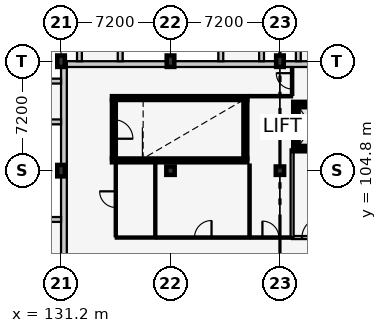
"""IFC4 building model, lengths in metres.
Left out: names, types, materials, properties, quantities, classifications, styles, units other than length and angle.
Written with IfcOpenShell. Run it as: python <this file> out.ifc"""

import sys

from ifc_helpers import new_model, si_unit, direction, frame, frame_2d, origin, origin_2d, place, context, subcontext, project, spatial, rectangle, extrude, element, fill, save


model = new_model("IFC4")
c1 = context("Model", 3, precision=1e-05, world=origin(), true_north=direction((0.0, 1.0)))
c2 = subcontext(c1, "Body", "Model", "MODEL_VIEW")
j1 = project(units=[si_unit("LENGTHUNIT", "METRE"), si_unit("PLANEANGLEUNIT", "RADIAN")], contexts=[c1])
p1 = place(None, origin())
s1 = spatial("IfcSite", under=j1, at=p1, CompositionType="ELEMENT")
p2 = place(p1, origin())
s2 = spatial("IfcBuilding", under=s1, at=p2, CompositionType="ELEMENT")
p3 = place(p2, frame((0.0, 0.0, 29.7)))
s3 = spatial("IfcBuildingStorey", under=s2, at=p3, CompositionType="ELEMENT", Elevation=29.7)
for number, where, z_axis, x_axis in (
    (1, (131.2, 104.8, 0.0), (0.0, 0.0, 1.0), (1.0, 0.0, 0.0)),
    (2, (131.2, 112.0, 0.0), (0.0, 0.0, 1.0), (1.0, 0.0, 0.0)),
):
    element("IfcColumn", number, at=place(p3, frame(where, z_axis=z_axis, x_axis=x_axis)), inside=s3, PredefinedType="COLUMN", context=c2, shape_type="SweptSolid", body=[
        extrude(rectangle(XDim=0.5, YDim=0.75, at=origin_2d()), origin(), (0.0, 0.0, 1.0), 4.2),
    ])
p4 = place(p3, frame((138.4, 104.8, 0.0), z_axis=(0.0, 0.0, 1.0), x_axis=(1.0, 0.0, 0.0)))
e3 = element("IfcColumn", 3, at=p4, inside=s3, PredefinedType="COLUMN", context=c2, shape_type="SweptSolid", body=[
    extrude(rectangle(XDim=0.55, YDim=0.55, at=origin_2d()), origin(), (0.0, 0.0, 1.0), 4.2),
])
p5 = place(p3, frame((138.4, 112.0, 0.0), z_axis=(0.0, 0.0, 1.0), x_axis=(1.0, 0.0, 0.0)))
e4 = element("IfcColumn", 4, at=p5, inside=s3, PredefinedType="COLUMN", context=c2, shape_type="SweptSolid", body=[
    extrude(rectangle(XDim=0.5, YDim=0.75, at=origin_2d()), origin(), (0.0, 0.0, 1.0), 4.2),
])
p6 = place(p3, frame((145.6, 104.8, 0.0), z_axis=(0.0, 0.0, 1.0), x_axis=(1.0, 0.0, 0.0)))
e5 = element("IfcColumn", 5, at=p6, inside=s3, PredefinedType="COLUMN", context=c2, shape_type="SweptSolid", body=[
    extrude(rectangle(XDim=0.55, YDim=0.55, at=origin_2d()), origin(), (0.0, 0.0, 1.0), 4.2),
])
p7 = place(p3, frame((145.6, 112.0, 0.0), z_axis=(0.0, 0.0, 1.0), x_axis=(1.0, 0.0, 0.0)))
e6 = element("IfcColumn", 6, at=p7, inside=s3, PredefinedType="COLUMN", context=c2, shape_type="SweptSolid", body=[
    extrude(rectangle(XDim=0.5, YDim=0.75, at=origin_2d()), origin(), (0.0, 0.0, 1.0), 4.2),
])
p8 = place(p3, frame((131.2, 111.81, 0.0), z_axis=(0.0, 0.0, 1.0), x_axis=(1.0, 0.0, 0.0)))
e7 = element("IfcWall", 7, at=p8, inside=s3, PredefinedType="SOLIDWALL", context=c2, shape_type="SweptSolid", body=[
    extrude(rectangle(XDim=28.8, YDim=0.38, at=frame_2d((14.4, 0.0))), origin(), (0.0, 0.0, 1.0), 3.495),
])
p9 = place(p3, frame((132.41, 112.0, 0.0), z_axis=(0.0, 0.0, 1.0), x_axis=(0.0, 1.0, 0.0)))
e8 = element("IfcWall", 8, at=p9, inside=s3, PredefinedType="SOLIDWALL", context=c2, shape_type="SweptSolid", body=[
    extrude(rectangle(XDim=1.793, YDim=0.32, at=frame_2d((0.896, 0.0))), origin(), (0.0, 0.0, 1.0), 4.18),
])
for number, where, z_axis, x_axis in (
    (9, (135.09, 112.0, 0.0), (0.0, 0.0, 1.0), (0.0, 1.0, 0.0)),
    (10, (141.71, 112.0, 0.0), (0.0, 0.0, 1.0), (0.0, 1.0, 0.0)),
):
    element("IfcWall", number, at=place(p3, frame(where, z_axis=z_axis, x_axis=x_axis)), inside=s3, PredefinedType="SOLIDWALL", context=c2, shape_type="SweptSolid", body=[
        extrude(rectangle(XDim=1.35, YDim=0.32, at=frame_2d((0.675, 0.0))), origin(), (0.0, 0.0, 1.0), 4.18),
    ])
for number, where, z_axis, x_axis in (
    (11, (144.39, 112.0, 0.0), (0.0, 0.0, 1.0), (0.0, 1.0, 0.0)),
    (12, (146.81, 112.0, 0.0), (0.0, 0.0, 1.0), (0.0, 1.0, 0.0)),
):
    element("IfcWall", number, at=place(p3, frame(where, z_axis=z_axis, x_axis=x_axis)), inside=s3, PredefinedType="SOLIDWALL", context=c2, shape_type="SweptSolid", body=[
        extrude(rectangle(XDim=1.793, YDim=0.32, at=frame_2d((0.896, 0.0))), origin(), (0.0, 0.0, 1.0), 4.18),
    ])
p10 = place(p3, frame((131.39, 83.2, 0.0), z_axis=(0.0, 0.0, 1.0), x_axis=(0.0, 1.0, 0.0)))
e13 = element("IfcWall", 13, at=p10, inside=s3, PredefinedType="SOLIDWALL", context=c2, shape_type="SweptSolid", body=[
    extrude(rectangle(XDim=28.8, YDim=0.38, at=frame_2d((14.4, 0.0))), origin(), (0.0, 0.0, 1.0), 3.455),
])
p11 = place(p10, frame((10.2, 0.0, 0.0)))
e14 = element("IfcOpeningElement", 14, at=p11, cuts=e13, PredefinedType="OPENING", context=c2, shape_type="SweptSolid", body=[
    extrude(rectangle(XDim=1.2, YDim=2.15, at=frame_2d((0.6, 1.075))), frame((0.0, 0.202, 0.0), z_axis=(0.0, -1.0, 0.0), x_axis=(1.0, 0.0, 0.0)), (0.0, 0.0, 1.0), 0.404),
])
for number, where, z_axis, x_axis in (
    (15, (131.2, 101.59, 0.0), (0.0, 0.0, 1.0), (-1.0, 0.0, 0.0)),
    (16, (131.2, 108.01, 0.0), (0.0, 0.0, 1.0), (-1.0, 0.0, 0.0)),
):
    element("IfcWall", number, at=place(p3, frame(where, z_axis=z_axis, x_axis=x_axis)), inside=s3, PredefinedType="SOLIDWALL", context=c2, shape_type="SweptSolid", body=[
        extrude(rectangle(XDim=1.35, YDim=0.32, at=frame_2d((0.675, 0.0))), origin(), (0.0, 0.0, 1.0), 4.18),
    ])
p12 = place(p3, frame((131.2, 110.69, 0.0), z_axis=(0.0, 0.0, 1.0), x_axis=(-1.0, 0.0, 0.0)))
e17 = element("IfcWall", 17, at=p12, inside=s3, PredefinedType="SOLIDWALL", context=c2, shape_type="SweptSolid", body=[
    extrude(rectangle(XDim=1.793, YDim=0.32, at=frame_2d((0.896, 0.0))), origin(), (0.0, 0.0, 1.0), 4.18),
])
for number, where, z_axis, x_axis in (
    (18, (134.55, 105.475, 0.0), (0.0, 0.0, 1.0), (1.0, 0.0, 0.0)),
    (19, (143.45, 109.575, 0.0), (0.0, 0.0, 1.0), (-1.0, 0.0, 0.0)),
):
    element("IfcWall", number, at=place(p3, frame(where, z_axis=z_axis, x_axis=x_axis)), inside=s3, PredefinedType="SHEAR", context=c2, shape_type="SweptSolid", body=[
        extrude(rectangle(XDim=8.9, YDim=0.25, at=frame_2d((4.45, 0.0))), origin(), (0.0, 0.0, 1.0), 4.2),
    ])
p13 = place(p3, frame((134.675, 109.45, 0.0), z_axis=(0.0, 0.0, 1.0), x_axis=(0.0, -1.0, 0.0)))
e20 = element("IfcWall", 20, at=p13, inside=s3, PredefinedType="SHEAR", context=c2, shape_type="SweptSolid", body=[
    extrude(rectangle(XDim=3.85, YDim=0.25, at=frame_2d((1.925, 0.0))), origin(), (0.0, 0.0, 1.0), 4.2),
])
p14 = place(p13, frame((1.3, 0.0, 0.0)))
e21 = element("IfcOpeningElement", 21, at=p14, cuts=e20, PredefinedType="OPENING", context=c2, shape_type="SweptSolid", body=[
    extrude(rectangle(XDim=1.25, YDim=2.15, at=frame_2d((0.625, 1.075))), frame((0.0, 0.137, 0.0), z_axis=(0.0, -1.0, 0.0), x_axis=(1.0, 0.0, 0.0)), (0.0, 0.0, 1.0), 0.274),
])
p15 = place(p3, frame((143.325, 105.6, 0.0), z_axis=(0.0, 0.0, 1.0), x_axis=(0.0, 1.0, 0.0)))
e22 = element("IfcWall", 22, at=p15, inside=s3, PredefinedType="SHEAR", context=c2, shape_type="SweptSolid", body=[
    extrude(rectangle(XDim=3.85, YDim=0.25, at=frame_2d((1.925, 0.0))), origin(), (0.0, 0.0, 1.0), 4.2),
])
p16 = place(p3, frame((146.475, 106.2, 0.0), z_axis=(0.0, 0.0, 1.0), x_axis=(1.0, 0.0, 0.0)))
e23 = element("IfcWall", 23, at=p16, inside=s3, PredefinedType="SHEAR", context=c2, shape_type="SweptSolid", body=[
    extrude(rectangle(XDim=2.45, YDim=0.25, at=frame_2d((1.225, 0.0))), origin(), (0.0, 0.0, 1.0), 4.2),
])
p17 = place(p16, frame((0.675, 0.0, 0.0)))
e24 = element("IfcOpeningElement", 24, at=p17, cuts=e23, PredefinedType="OPENING", context=c2, shape_type="SweptSolid", body=[
    extrude(rectangle(XDim=1.1, YDim=2.15, at=frame_2d((0.55, 1.075))), frame((0.0, 0.137, 0.0), z_axis=(0.0, -1.0, 0.0), x_axis=(1.0, 0.0, 0.0)), (0.0, 0.0, 1.0), 0.274),
])
p18 = place(p3, frame((148.925, 109.2, 0.0), z_axis=(0.0, 0.0, 1.0), x_axis=(-1.0, 0.0, 0.0)))
e25 = element("IfcWall", 25, at=p18, inside=s3, PredefinedType="SHEAR", context=c2, shape_type="SweptSolid", body=[
    extrude(rectangle(XDim=2.45, YDim=0.25, at=frame_2d((1.225, 0.0))), origin(), (0.0, 0.0, 1.0), 4.2),
])
p19 = place(p3, frame((146.6, 109.2, 0.0), z_axis=(0.0, 0.0, 1.0), x_axis=(0.0, -1.0, 0.0)))
e26 = element("IfcWall", 26, at=p19, inside=s3, PredefinedType="SHEAR", context=c2, shape_type="SweptSolid", body=[
    extrude(rectangle(XDim=3.0, YDim=0.25, at=frame_2d((1.5, 0.0))), origin(), (0.0, 0.0, 1.0), 4.2),
])
p20 = place(p3, frame((146.4, 100.4, 0.0), z_axis=(0.0, 0.0, 1.0), x_axis=(1.0, 0.0, 0.0)))
e27 = element("IfcWall", 27, at=p20, inside=s3, PredefinedType="PARTITIONING", context=c2, shape_type="SweptSolid", body=[
    extrude(rectangle(XDim=2.6, YDim=0.2, at=frame_2d((1.3, 0.0))), origin(), (0.0, 0.0, 1.0), 4.2),
])
p21 = place(p20, frame((0.65, 0.0, 0.0)))
e28 = element("IfcOpeningElement", 28, at=p21, cuts=e27, PredefinedType="OPENING", context=c2, shape_type="SweptSolid", body=[
    extrude(rectangle(XDim=1.3, YDim=2.2, at=frame_2d((0.65, 1.1))), frame((0.0, 0.112, 0.0), z_axis=(0.0, -1.0, 0.0), x_axis=(1.0, 0.0, 0.0)), (0.0, 0.0, 1.0), 0.224),
])
p22 = place(p3, frame((146.4, 106.2, 0.0), z_axis=(0.0, 0.0, 1.0), x_axis=(0.0, -1.0, 0.0)))
e29 = element("IfcWall", 29, at=p22, inside=s3, PredefinedType="PARTITIONING", context=c2, shape_type="SweptSolid", body=[
    extrude(rectangle(XDim=5.8, YDim=0.2, at=frame_2d((2.9, 0.0))), origin(), (0.0, 0.0, 1.0), 4.2),
])
p23 = place(p3, frame((134.8, 100.4, 0.0), z_axis=(0.0, 0.0, 1.0), x_axis=(1.0, 0.0, 0.0)))
e30 = element("IfcWall", 30, at=p23, inside=s3, PredefinedType="PARTITIONING", context=c2, shape_type="SweptSolid", body=[
    extrude(rectangle(XDim=2.6, YDim=0.14, at=frame_2d((1.3, 0.0))), origin(), (0.0, 0.0, 1.0), 4.2),
])
p24 = place(p3, frame((134.8, 100.48, 0.0), z_axis=(0.0, 0.0, 1.0), x_axis=(0.0, 1.0, 0.0)))
e31 = element("IfcWall", 31, at=p24, inside=s3, PredefinedType="PARTITIONING", context=c2, shape_type="SweptSolid", body=[
    extrude(rectangle(XDim=4.86, YDim=0.14, at=frame_2d((2.43, 0.0))), origin(), (0.0, 0.0, 1.0), 4.2),
])
p25 = place(p24, frame((1.9, 0.0, 0.0)))
e32 = element("IfcOpeningElement", 32, at=p25, cuts=e31, PredefinedType="OPENING", context=c2, shape_type="SweptSolid", body=[
    extrude(rectangle(XDim=1.06, YDim=2.1, at=frame_2d((0.53, 1.05))), frame((0.0, 0.082, 0.0), z_axis=(0.0, -1.0, 0.0), x_axis=(1.0, 0.0, 0.0)), (0.0, 0.0, 1.0), 0.164),
])
p26 = place(p3, frame((137.4, 100.48, 0.0), z_axis=(0.0, 0.0, 1.0), x_axis=(0.0, 1.0, 0.0)))
e33 = element("IfcWall", 33, at=p26, inside=s3, PredefinedType="PARTITIONING", context=c2, shape_type="SweptSolid", body=[
    extrude(rectangle(XDim=4.86, YDim=0.14, at=frame_2d((2.43, 0.0))), origin(), (0.0, 0.0, 1.0), 4.2),
])
p27 = place(p3, frame((137.48, 100.4, 0.0), z_axis=(0.0, 0.0, 1.0), x_axis=(1.0, 0.0, 0.0)))
e34 = element("IfcWall", 34, at=p27, inside=s3, PredefinedType="PARTITIONING", context=c2, shape_type="SweptSolid", body=[
    extrude(rectangle(XDim=6.12, YDim=0.15, at=frame_2d((3.06, 0.0))), origin(), (0.0, 0.0, 1.0), 4.2),
])
p28 = place(p27, frame((2.5, 0.0, 0.0)))
e35 = element("IfcOpeningElement", 35, at=p28, cuts=e34, PredefinedType="OPENING", context=c2, shape_type="SweptSolid", body=[
    extrude(rectangle(XDim=1.12, YDim=2.15, at=frame_2d((0.56, 1.075))), frame((0.0, 0.087, 0.0), z_axis=(0.0, -1.0, 0.0), x_axis=(1.0, 0.0, 0.0)), (0.0, 0.0, 1.0), 0.174),
])
p29 = place(p3, frame((143.6, 100.485, 0.0), z_axis=(0.0, 0.0, 1.0), x_axis=(0.0, 1.0, 0.0)))
e36 = element("IfcWall", 36, at=p29, inside=s3, PredefinedType="PARTITIONING", context=c2, shape_type="SweptSolid", body=[
    extrude(rectangle(XDim=4.715, YDim=0.15, at=frame_2d((2.357, 0.0))), origin(), (0.0, 0.0, 1.0), 4.2),
])
p30 = place(p3, frame((143.685, 100.4, 0.0), z_axis=(0.0, 0.0, 1.0), x_axis=(1.0, 0.0, 0.0)))
e37 = element("IfcWall", 37, at=p30, inside=s3, PredefinedType="PARTITIONING", context=c2, shape_type="SweptSolid", body=[
    extrude(rectangle(XDim=2.605, YDim=0.15, at=frame_2d((1.302, 0.0))), origin(), (0.0, 0.0, 1.0), 4.2),
])
p31 = place(p30, frame((0.762, 0.0, 0.0)))
e38 = element("IfcOpeningElement", 38, at=p31, cuts=e37, PredefinedType="OPENING", context=c2, shape_type="SweptSolid", body=[
    extrude(rectangle(XDim=1.08, YDim=2.15, at=frame_2d((0.54, 1.075))), frame((0.0, 0.087, 0.0), z_axis=(0.0, -1.0, 0.0), x_axis=(1.0, 0.0, 0.0)), (0.0, 0.0, 1.0), 0.174),
])
p32 = place(p3, frame((143.6, 109.7, 0.0), z_axis=(0.0, 0.0, 1.0), x_axis=(1.0, 0.0, 0.0)))
e39 = element("IfcWall", 39, at=p32, inside=s3, PredefinedType="PARTITIONING", context=c2, shape_type="SweptSolid", body=[
    extrude(rectangle(XDim=2.8, YDim=0.15, at=frame_2d((1.4, 0.0))), origin(), (0.0, 0.0, 1.0), 4.2),
])
p33 = place(p3, frame((146.4, 109.785, 0.0), z_axis=(0.0, 0.0, 1.0), x_axis=(0.0, 1.0, 0.0)))
e40 = element("IfcWall", 40, at=p33, inside=s3, PredefinedType="PARTITIONING", context=c2, shape_type="SweptSolid", body=[
    extrude(rectangle(XDim=1.815, YDim=0.15, at=frame_2d((0.908, 0.0))), origin(), (0.0, 0.0, 1.0), 4.2),
])
p34 = place(p33, frame((0.387, 0.0, 0.0)))
e41 = element("IfcOpeningElement", 41, at=p34, cuts=e40, PredefinedType="OPENING", context=c2, shape_type="SweptSolid", body=[
    extrude(rectangle(XDim=1.04, YDim=2.15, at=frame_2d((0.52, 1.075))), frame((0.0, 0.087, 0.0), z_axis=(0.0, -1.0, 0.0), x_axis=(1.0, 0.0, 0.0)), (0.0, 0.0, 1.0), 0.174),
])
p35 = place(p14, origin())
e42 = element("IfcDoor", 42, at=p35, inside=s3, OperationType="SINGLE_SWING_RIGHT", PredefinedType="DOOR", context=c2, shape_type="SweptSolid", body=[
    extrude(rectangle(XDim=1.25, YDim=2.15, at=frame_2d((0.625, 1.075))), frame((0.0, 0.025, 0.0), z_axis=(0.0, -1.0, 0.0), x_axis=(1.0, 0.0, 0.0)), (0.0, 0.0, 1.0), 0.05),
])
fill(e21, e42)
p36 = place(p17, origin())
e43 = element("IfcDoor", 43, at=p36, inside=s3, OperationType="SLIDING_TO_LEFT", PredefinedType="DOOR", context=c2, shape_type="SweptSolid", body=[
    extrude(rectangle(XDim=1.1, YDim=2.15, at=frame_2d((0.55, 1.075))), frame((0.0, 0.025, 0.0), z_axis=(0.0, -1.0, 0.0), x_axis=(1.0, 0.0, 0.0)), (0.0, 0.0, 1.0), 0.05),
])
fill(e24, e43)
p37 = place(p21, origin())
e44 = element("IfcDoor", 44, at=p37, inside=s3, OperationType="SINGLE_SWING_RIGHT", PredefinedType="DOOR", context=c2, shape_type="SweptSolid", body=[
    extrude(rectangle(XDim=1.3, YDim=2.2, at=frame_2d((0.65, 1.1))), frame((0.0, 0.025, 0.0), z_axis=(0.0, -1.0, 0.0), x_axis=(1.0, 0.0, 0.0)), (0.0, 0.0, 1.0), 0.05),
])
fill(e28, e44)
p38 = place(p25, origin())
e45 = element("IfcDoor", 45, at=p38, inside=s3, OperationType="SINGLE_SWING_RIGHT", PredefinedType="DOOR", context=c2, shape_type="SweptSolid", body=[
    extrude(rectangle(XDim=1.06, YDim=2.1, at=frame_2d((0.53, 1.05))), frame((0.0, 0.025, 0.0), z_axis=(0.0, -1.0, 0.0), x_axis=(1.0, 0.0, 0.0)), (0.0, 0.0, 1.0), 0.05),
])
fill(e32, e45)
p39 = place(p28, origin())
e46 = element("IfcDoor", 46, at=p39, inside=s3, OperationType="SINGLE_SWING_RIGHT", PredefinedType="DOOR", context=c2, shape_type="SweptSolid", body=[
    extrude(rectangle(XDim=1.12, YDim=2.15, at=frame_2d((0.56, 1.075))), frame((0.0, 0.025, 0.0), z_axis=(0.0, -1.0, 0.0), x_axis=(1.0, 0.0, 0.0)), (0.0, 0.0, 1.0), 0.05),
])
fill(e35, e46)
p40 = place(p31, origin())
e47 = element("IfcDoor", 47, at=p40, inside=s3, OperationType="SINGLE_SWING_LEFT", PredefinedType="DOOR", context=c2, shape_type="SweptSolid", body=[
    extrude(rectangle(XDim=1.08, YDim=2.15, at=frame_2d((0.54, 1.075))), frame((0.0, 0.025, 0.0), z_axis=(0.0, -1.0, 0.0), x_axis=(1.0, 0.0, 0.0)), (0.0, 0.0, 1.0), 0.05),
])
fill(e38, e47)
p41 = place(p34, origin())
e48 = element("IfcDoor", 48, at=p41, inside=s3, OperationType="SINGLE_SWING_RIGHT", PredefinedType="DOOR", context=c2, shape_type="SweptSolid", body=[
    extrude(rectangle(XDim=1.04, YDim=2.15, at=frame_2d((0.52, 1.075))), frame((0.0, 0.025, 0.0), z_axis=(0.0, -1.0, 0.0), x_axis=(1.0, 0.0, 0.0)), (0.0, 0.0, 1.0), 0.05),
])
fill(e41, e48)
save(model, sys.argv[1])
